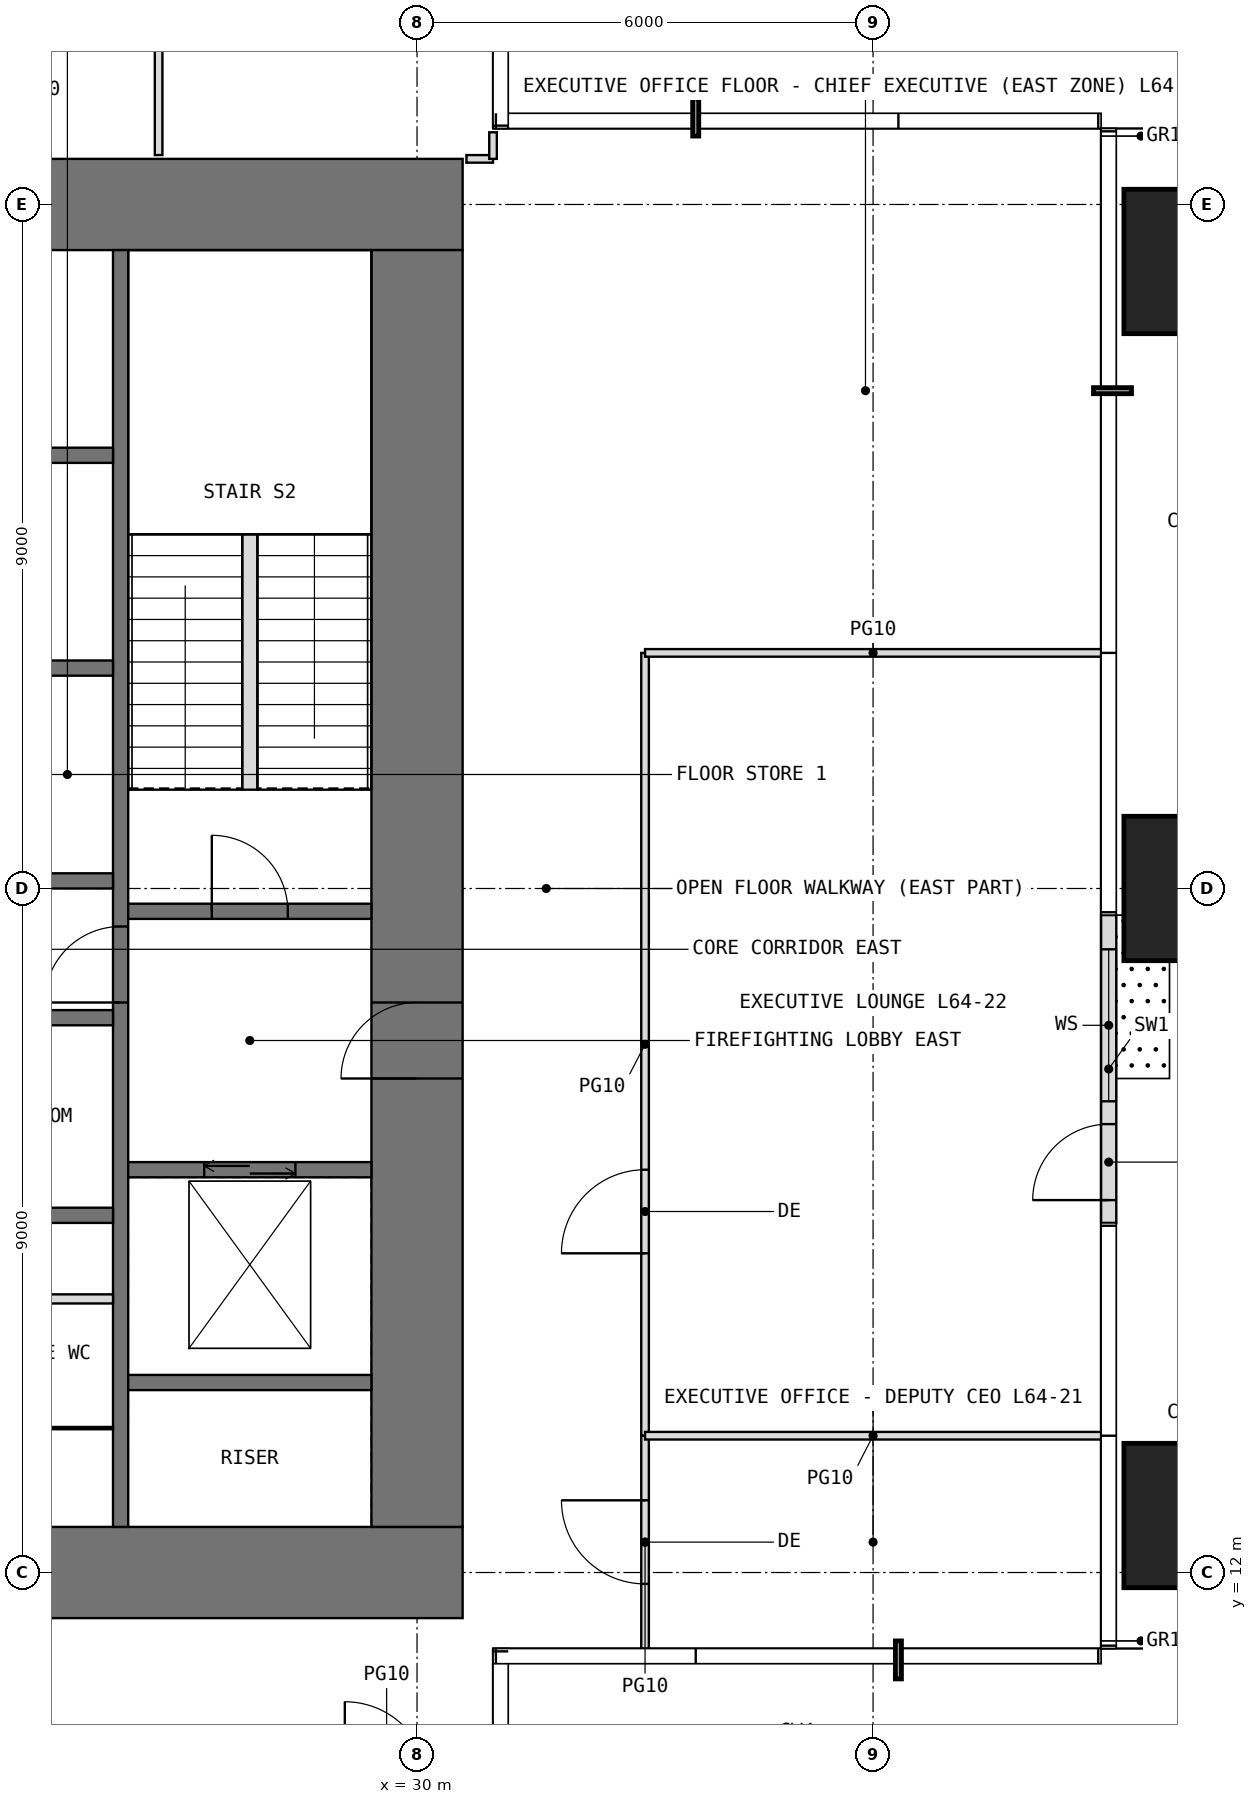
"""IFC4 building model, lengths in metres.
Left out: names, types, materials, properties, quantities, classifications, styles, units other than length and angle.
Written with IfcOpenShell. Run it as: python <this file> out.ifc"""

import sys

from ifc_helpers import new_model, si_unit, direction, frame, frame_2d, origin, origin_2d, place, context, subcontext, project, spatial, rectangle, extrude, element, fill, save


model = new_model("IFC4")
c1 = context("Model", 3, precision=1e-05, world=origin(), true_north=direction((0.0, 1.0)))
c2 = subcontext(c1, "Body", "Model", "MODEL_VIEW")
j1 = project(units=[si_unit("LENGTHUNIT", "METRE"), si_unit("PLANEANGLEUNIT", "RADIAN")], contexts=[c1])
p1 = place(None, origin())
s1 = spatial("IfcSite", under=j1, at=p1, CompositionType="ELEMENT")
p2 = place(p1, origin())
s2 = spatial("IfcBuilding", under=s1, at=p2, CompositionType="ELEMENT")
p3 = place(p2, frame((0.0, 0.0, 269.2)))
s3 = spatial("IfcBuildingStorey", under=s2, at=p3, CompositionType="ELEMENT", Elevation=269.2)
for number, where, z_axis, x_axis in (
    (1, (40.25, 12.75, 0.0), (0.0, 0.0, 1.0), (1.0, 0.0, 0.0)),
    (2, (40.25, 21.0, 0.0), (0.0, 0.0, 1.0), (1.0, 0.0, 0.0)),
    (3, (40.25, 29.25, 0.0), (0.0, 0.0, 1.0), (1.0, 0.0, 0.0)),
):
    element("IfcColumn", number, at=place(p3, frame(where, z_axis=z_axis, x_axis=x_axis)), inside=s3, PredefinedType="COLUMN", context=c2, shape_type="SweptSolid", body=[
        extrude(rectangle(XDim=1.9, YDim=1.9, at=origin_2d()), origin(), (0.0, 0.0, 1.0), 4.2),
    ])
p4 = place(p3, frame((39.1, 16.6, 0.0), z_axis=(0.0, 0.0, 1.0), x_axis=(0.0, 1.0, 0.0)))
e4 = element("IfcWall", 4, at=p4, inside=s3, PredefinedType="USERDEFINED", context=c2, shape_type="SweptSolid", body=[
    extrude(rectangle(XDim=4.05, YDim=0.2, at=frame_2d((2.025, 0.0))), origin(), (0.0, 0.0, 1.0), 3.95),
])
p5 = place(p4, frame((0.3, 0.0, 0.0)))
e5 = element("IfcOpeningElement", 5, at=p5, cuts=e4, PredefinedType="OPENING", context=c2, shape_type="SweptSolid", body=[
    extrude(rectangle(XDim=1.0, YDim=2.4, at=frame_2d((0.5, 1.2))), frame((0.0, 0.11, 0.0), z_axis=(0.0, -1.0, 0.0), x_axis=(1.0, 0.0, 0.0)), (0.0, 0.0, 1.0), 0.22),
])
p6 = place(p4, frame((1.6, 0.0, 0.3)))
e6 = element("IfcOpeningElement", 6, at=p6, cuts=e4, PredefinedType="OPENING", context=c2, shape_type="SweptSolid", body=[
    extrude(rectangle(XDim=2.0, YDim=2.7, at=frame_2d((1.0, 1.35))), frame((0.0, 0.11, 0.0), z_axis=(0.0, -1.0, 0.0), x_axis=(1.0, 0.0, 0.0)), (0.0, 0.0, 1.0), 0.22),
])
p7 = place(p3, frame((11.4, 12.0, -0.05), z_axis=(0.0, 0.0, 1.0), x_axis=(1.0, 0.0, 0.0)))
e7 = element("IfcWall", 7, at=p7, inside=s3, PredefinedType="SHEAR", context=c2, shape_type="SweptSolid", body=[
    extrude(rectangle(XDim=19.2, YDim=1.2, at=frame_2d((9.6, 0.0))), origin(), (0.0, 0.0, 1.0), 4.2),
])
p8 = place(p7, frame((8.6, 0.0, 0.05)))
e8 = element("IfcOpeningElement", 8, at=p8, cuts=e7, PredefinedType="OPENING", context=c2, shape_type="SweptSolid", body=[
    extrude(rectangle(XDim=2.0, YDim=2.2, at=frame_2d((1.0, 1.1))), frame((0.0, 0.61, 0.0), z_axis=(0.0, -1.0, 0.0), x_axis=(1.0, 0.0, 0.0)), (0.0, 0.0, 1.0), 1.22),
])
p9 = place(p3, frame((11.4, 30.0, -0.05), z_axis=(0.0, 0.0, 1.0), x_axis=(1.0, 0.0, 0.0)))
e9 = element("IfcWall", 9, at=p9, inside=s3, PredefinedType="SHEAR", context=c2, shape_type="SweptSolid", body=[
    extrude(rectangle(XDim=19.2, YDim=1.2, at=frame_2d((9.6, 0.0))), origin(), (0.0, 0.0, 1.0), 4.2),
])
p10 = place(p9, frame((8.6, 0.0, 0.05)))
e10 = element("IfcOpeningElement", 10, at=p10, cuts=e9, PredefinedType="OPENING", context=c2, shape_type="SweptSolid", body=[
    extrude(rectangle(XDim=2.0, YDim=2.2, at=frame_2d((1.0, 1.1))), frame((0.0, 0.61, 0.0), z_axis=(0.0, -1.0, 0.0), x_axis=(1.0, 0.0, 0.0)), (0.0, 0.0, 1.0), 1.22),
])
p11 = place(p3, frame((30.0, 12.6, -0.05), z_axis=(0.0, 0.0, 1.0), x_axis=(0.0, 1.0, 0.0)))
e11 = element("IfcWall", 11, at=p11, inside=s3, PredefinedType="SHEAR", context=c2, shape_type="SweptSolid", body=[
    extrude(rectangle(XDim=16.8, YDim=1.2, at=frame_2d((8.4, 0.0))), origin(), (0.0, 0.0, 1.0), 4.2),
])
p12 = place(p11, frame((5.9, 0.0, 0.05)))
e12 = element("IfcOpeningElement", 12, at=p12, cuts=e11, PredefinedType="OPENING", context=c2, shape_type="SweptSolid", body=[
    extrude(rectangle(XDim=1.0, YDim=2.2, at=frame_2d((0.5, 1.1))), frame((0.0, 0.61, 0.0), z_axis=(0.0, -1.0, 0.0), x_axis=(1.0, 0.0, 0.0)), (0.0, 0.0, 1.0), 1.22),
])
p13 = place(p3, frame((26.1, 12.6, -0.05), z_axis=(0.0, 0.0, 1.0), x_axis=(0.0, 1.0, 0.0)))
e13 = element("IfcWall", 13, at=p13, inside=s3, PredefinedType="SHEAR", context=c2, shape_type="SweptSolid", body=[
    extrude(rectangle(XDim=16.8, YDim=0.2, at=frame_2d((8.4, 0.0))), origin(), (0.0, 0.0, 1.0), 4.2),
])
p14 = place(p13, frame((6.9, 0.0, 0.05)))
e14 = element("IfcOpeningElement", 14, at=p14, cuts=e13, PredefinedType="OPENING", context=c2, shape_type="SweptSolid", body=[
    extrude(rectangle(XDim=1.0, YDim=2.2, at=frame_2d((0.5, 1.1))), frame((0.0, 0.11, 0.0), z_axis=(0.0, -1.0, 0.0), x_axis=(1.0, 0.0, 0.0)), (0.0, 0.0, 1.0), 0.22),
])
for number, where, z_axis, x_axis in (
    (15, (22.8, 16.7, -0.05), (0.0, 0.0, 1.0), (1.0, 0.0, 0.0)),
    (16, (22.8, 19.3, -0.05), (0.0, 0.0, 1.0), (1.0, 0.0, 0.0)),
    (17, (22.8, 21.1, -0.05), (0.0, 0.0, 1.0), (1.0, 0.0, 0.0)),
    (18, (22.8, 23.9, -0.05), (0.0, 0.0, 1.0), (1.0, 0.0, 0.0)),
    (19, (22.8, 26.7, -0.05), (0.0, 0.0, 1.0), (1.0, 0.0, 0.0)),
    (20, (26.2, 14.5, -0.05), (0.0, 0.0, 1.0), (1.0, 0.0, 0.0)),
):
    element("IfcWall", number, at=place(p3, frame(where, z_axis=z_axis, x_axis=x_axis)), inside=s3, PredefinedType="SHEAR", context=c2, shape_type="SweptSolid", body=[
        extrude(rectangle(XDim=3.2, YDim=0.2, at=frame_2d((1.6, 0.0))), origin(), (0.0, 0.0, 1.0), 4.2),
    ])
p15 = place(p3, frame((26.2, 17.3, -0.05), z_axis=(0.0, 0.0, 1.0), x_axis=(1.0, 0.0, 0.0)))
e21 = element("IfcWall", 21, at=p15, inside=s3, PredefinedType="SHEAR", context=c2, shape_type="SweptSolid", body=[
    extrude(rectangle(XDim=3.2, YDim=0.2, at=frame_2d((1.6, 0.0))), origin(), (0.0, 0.0, 1.0), 4.2),
])
p16 = place(p15, frame((1.0, 0.0, 0.05)))
e22 = element("IfcOpeningElement", 22, at=p16, cuts=e21, PredefinedType="OPENING", context=c2, shape_type="SweptSolid", body=[
    extrude(rectangle(XDim=1.2, YDim=2.2, at=frame_2d((0.6, 1.1))), frame((0.0, 0.11, 0.0), z_axis=(0.0, -1.0, 0.0), x_axis=(1.0, 0.0, 0.0)), (0.0, 0.0, 1.0), 0.22),
])
p17 = place(p3, frame((26.2, 20.7, -0.05), z_axis=(0.0, 0.0, 1.0), x_axis=(1.0, 0.0, 0.0)))
e23 = element("IfcWall", 23, at=p17, inside=s3, PredefinedType="SHEAR", context=c2, shape_type="SweptSolid", body=[
    extrude(rectangle(XDim=3.2, YDim=0.2, at=frame_2d((1.6, 0.0))), origin(), (0.0, 0.0, 1.0), 4.2),
])
p18 = place(p17, frame((1.1, 0.0, 0.05)))
e24 = element("IfcOpeningElement", 24, at=p18, cuts=e23, PredefinedType="OPENING", context=c2, shape_type="SweptSolid", body=[
    extrude(rectangle(XDim=1.0, YDim=2.2, at=frame_2d((0.5, 1.1))), frame((0.0, 0.11, 0.0), z_axis=(0.0, -1.0, 0.0), x_axis=(1.0, 0.0, 0.0)), (0.0, 0.0, 1.0), 0.22),
])
p19 = place(p3, frame((22.8, 15.6, 0.0), z_axis=(0.0, 0.0, 1.0), x_axis=(1.0, 0.0, 0.0)))
e25 = element("IfcWall", 25, at=p19, inside=s3, PredefinedType="PARTITIONING", context=c2, shape_type="SweptSolid", body=[
    extrude(rectangle(XDim=3.2, YDim=0.12, at=frame_2d((1.6, 0.0))), origin(), (0.0, 0.0, 1.0), 3.95),
])
p20 = place(p3, frame((24.6, 13.9, 0.0), z_axis=(0.0, 0.0, 1.0), x_axis=(1.0, 0.0, 0.0)))
e26 = element("IfcWall", 26, at=p20, inside=s3, PredefinedType="PARTITIONING", context=c2, shape_type="SweptSolid", body=[
    extrude(rectangle(XDim=1.4, YDim=0.03, at=frame_2d((0.7, 0.0))), origin(), (0.0, 0.0, 1.0), 3.95),
])
p21 = place(p3, frame((26.6, 30.65, 0.0), z_axis=(0.0, 0.0, 1.0), x_axis=(0.0, 1.0, 0.0)))
e27 = element("IfcWall", 27, at=p21, inside=s3, PredefinedType="PARTITIONING", context=c2, shape_type="SweptSolid", body=[
    extrude(rectangle(XDim=3.45, YDim=0.1, at=frame_2d((1.725, 0.0))), origin(), (0.0, 0.0, 1.0), 3.95),
])
p22 = place(p3, frame((30.65, 30.6, 0.0), z_axis=(0.0, 0.0, 1.0), x_axis=(1.0, 0.0, 0.0)))
e28 = element("IfcWall", 28, at=p22, inside=s3, PredefinedType="PARTITIONING", context=c2, shape_type="SweptSolid", body=[
    extrude(rectangle(XDim=0.35, YDim=0.1, at=frame_2d((0.175, 0.0))), origin(), (0.0, 0.0, 1.0), 3.95),
])
p23 = place(p3, frame((31.0, 30.6, 0.0), z_axis=(0.0, 0.0, 1.0), x_axis=(0.0, 1.0, 0.0)))
e29 = element("IfcWall", 29, at=p23, inside=s3, PredefinedType="PARTITIONING", context=c2, shape_type="SweptSolid", body=[
    extrude(rectangle(XDim=0.35, YDim=0.1, at=frame_2d((0.175, 0.0))), origin(), (0.0, 0.0, 1.0), 3.95),
])
p24 = place(p3, frame((33.0, 11.0, 0.0), z_axis=(0.0, 0.0, 1.0), x_axis=(0.0, 1.0, 0.0)))
e30 = element("IfcWall", 30, at=p24, inside=s3, PredefinedType="PARTITIONING", context=c2, shape_type="SweptSolid", body=[
    extrude(rectangle(XDim=2.8, YDim=0.1, at=frame_2d((1.4, 0.0))), origin(), (0.0, 0.0, 1.0), 3.95),
])
p25 = place(p24, frame((0.85, 0.0, 0.0)))
e31 = element("IfcOpeningElement", 31, at=p25, cuts=e30, PredefinedType="OPENING", context=c2, shape_type="SweptSolid", body=[
    extrude(rectangle(XDim=1.1, YDim=2.3, at=frame_2d((0.55, 1.15))), frame((0.0, 0.06, 0.0), z_axis=(0.0, -1.0, 0.0), x_axis=(1.0, 0.0, 0.0)), (0.0, 0.0, 1.0), 0.12),
])
p26 = place(p3, frame((33.0, 13.8, 0.0), z_axis=(0.0, 0.0, 1.0), x_axis=(0.0, 1.0, 0.0)))
e32 = element("IfcWall", 32, at=p26, inside=s3, PredefinedType="PARTITIONING", context=c2, shape_type="SweptSolid", body=[
    extrude(rectangle(XDim=10.3, YDim=0.1, at=frame_2d((5.15, 0.0))), origin(), (0.0, 0.0, 1.0), 3.95),
])
p27 = place(p26, frame((2.4, 0.0, 0.0)))
e33 = element("IfcOpeningElement", 33, at=p27, cuts=e32, PredefinedType="OPENING", context=c2, shape_type="SweptSolid", body=[
    extrude(rectangle(XDim=1.1, YDim=2.3, at=frame_2d((0.55, 1.15))), frame((0.0, 0.06, 0.0), z_axis=(0.0, -1.0, 0.0), x_axis=(1.0, 0.0, 0.0)), (0.0, 0.0, 1.0), 0.12),
])
for number, where, z_axis, x_axis in (
    (34, (33.0, 13.8, 0.0), (0.0, 0.0, 1.0), (1.0, 0.0, 0.0)),
    (35, (33.0, 24.1, 0.0), (0.0, 0.0, 1.0), (1.0, 0.0, 0.0)),
):
    element("IfcWall", number, at=place(p3, frame(where, z_axis=z_axis, x_axis=x_axis)), inside=s3, PredefinedType="PARTITIONING", context=c2, shape_type="SweptSolid", body=[
        extrude(rectangle(XDim=6.0, YDim=0.1, at=frame_2d((3.0, 0.0))), origin(), (0.0, 0.0, 1.0), 3.95),
    ])
p28 = place(p3, frame((27.8, 22.3, 0.0), z_axis=(0.0, 0.0, 1.0), x_axis=(0.0, 1.0, 0.0)))
e36 = element("IfcWall", 36, at=p28, inside=s3, PredefinedType="PARTITIONING", context=c2, shape_type="SweptSolid", body=[
    extrude(rectangle(XDim=3.36, YDim=0.2, at=frame_2d((1.68, 0.0))), origin(), (0.0, 0.0, 1.0), 4.2),
])
p29 = place(p5, origin())
e37 = element("IfcDoor", 37, at=p29, inside=s3, OperationType="SINGLE_SWING_LEFT", PredefinedType="DOOR", context=c2, shape_type="SweptSolid", body=[
    extrude(rectangle(XDim=1.0, YDim=2.4, at=frame_2d((0.5, 1.2))), frame((0.0, 0.025, 0.0), z_axis=(0.0, -1.0, 0.0), x_axis=(1.0, 0.0, 0.0)), (0.0, 0.0, 1.0), 0.05),
])
fill(e5, e37)
p30 = place(p6, origin())
e38 = element("IfcWindow", 38, at=p30, inside=s3, PartitioningType="SINGLE_PANEL", PredefinedType="WINDOW", context=c2, shape_type="SweptSolid", body=[
    extrude(rectangle(XDim=2.0, YDim=2.7, at=frame_2d((1.0, 1.35))), frame((0.0, 0.03, 0.0), z_axis=(0.0, -1.0, 0.0), x_axis=(1.0, 0.0, 0.0)), (0.0, 0.0, 1.0), 0.06),
])
fill(e6, e38)
p31 = place(p12, origin())
e39 = element("IfcDoor", 39, at=p31, inside=s3, OperationType="SINGLE_SWING_LEFT", PredefinedType="DOOR", context=c2, shape_type="SweptSolid", body=[
    extrude(rectangle(XDim=1.0, YDim=2.2, at=frame_2d((0.5, 1.1))), frame((0.0, 0.025, 0.0), z_axis=(0.0, -1.0, 0.0), x_axis=(1.0, 0.0, 0.0)), (0.0, 0.0, 1.0), 0.05),
])
fill(e12, e39)
p32 = place(p18, origin())
e40 = element("IfcDoor", 40, at=p32, inside=s3, OperationType="SINGLE_SWING_LEFT", PredefinedType="DOOR", context=c2, shape_type="SweptSolid", body=[
    extrude(rectangle(XDim=1.0, YDim=2.2, at=frame_2d((0.5, 1.1))), frame((0.0, 0.025, 0.0), z_axis=(0.0, -1.0, 0.0), x_axis=(1.0, 0.0, 0.0)), (0.0, 0.0, 1.0), 0.05),
])
fill(e24, e40)
p33 = place(p14, origin())
e41 = element("IfcDoor", 41, at=p33, inside=s3, OperationType="SINGLE_SWING_LEFT", PredefinedType="DOOR", context=c2, shape_type="SweptSolid", body=[
    extrude(rectangle(XDim=1.0, YDim=2.2, at=frame_2d((0.5, 1.1))), frame((0.0, 0.025, 0.0), z_axis=(0.0, -1.0, 0.0), x_axis=(1.0, 0.0, 0.0)), (0.0, 0.0, 1.0), 0.05),
])
fill(e14, e41)
p34 = place(p25, origin())
e42 = element("IfcDoor", 42, at=p34, inside=s3, OperationType="SINGLE_SWING_RIGHT", PredefinedType="DOOR", context=c2, shape_type="SweptSolid", body=[
    extrude(rectangle(XDim=1.1, YDim=2.3, at=frame_2d((0.55, 1.15))), frame((0.0, 0.025, 0.0), z_axis=(0.0, -1.0, 0.0), x_axis=(1.0, 0.0, 0.0)), (0.0, 0.0, 1.0), 0.05),
])
fill(e31, e42)
p35 = place(p27, origin())
e43 = element("IfcDoor", 43, at=p35, inside=s3, OperationType="SINGLE_SWING_LEFT", PredefinedType="DOOR", context=c2, shape_type="SweptSolid", body=[
    extrude(rectangle(XDim=1.1, YDim=2.3, at=frame_2d((0.55, 1.15))), frame((0.0, 0.025, 0.0), z_axis=(0.0, -1.0, 0.0), x_axis=(1.0, 0.0, 0.0)), (0.0, 0.0, 1.0), 0.05),
])
fill(e33, e43)
p36 = place(p16, origin())
e44 = element("IfcDoor", 44, at=p36, inside=s3, OperationType="DOUBLE_DOOR_SLIDING", PredefinedType="DOOR", context=c2, shape_type="SweptSolid", body=[
    extrude(rectangle(XDim=1.2, YDim=2.2, at=frame_2d((0.6, 1.1))), frame((0.0, 0.025, 0.0), z_axis=(0.0, -1.0, 0.0), x_axis=(1.0, 0.0, 0.0)), (0.0, 0.0, 1.0), 0.05),
])
fill(e22, e44)
save(model, sys.argv[1])
